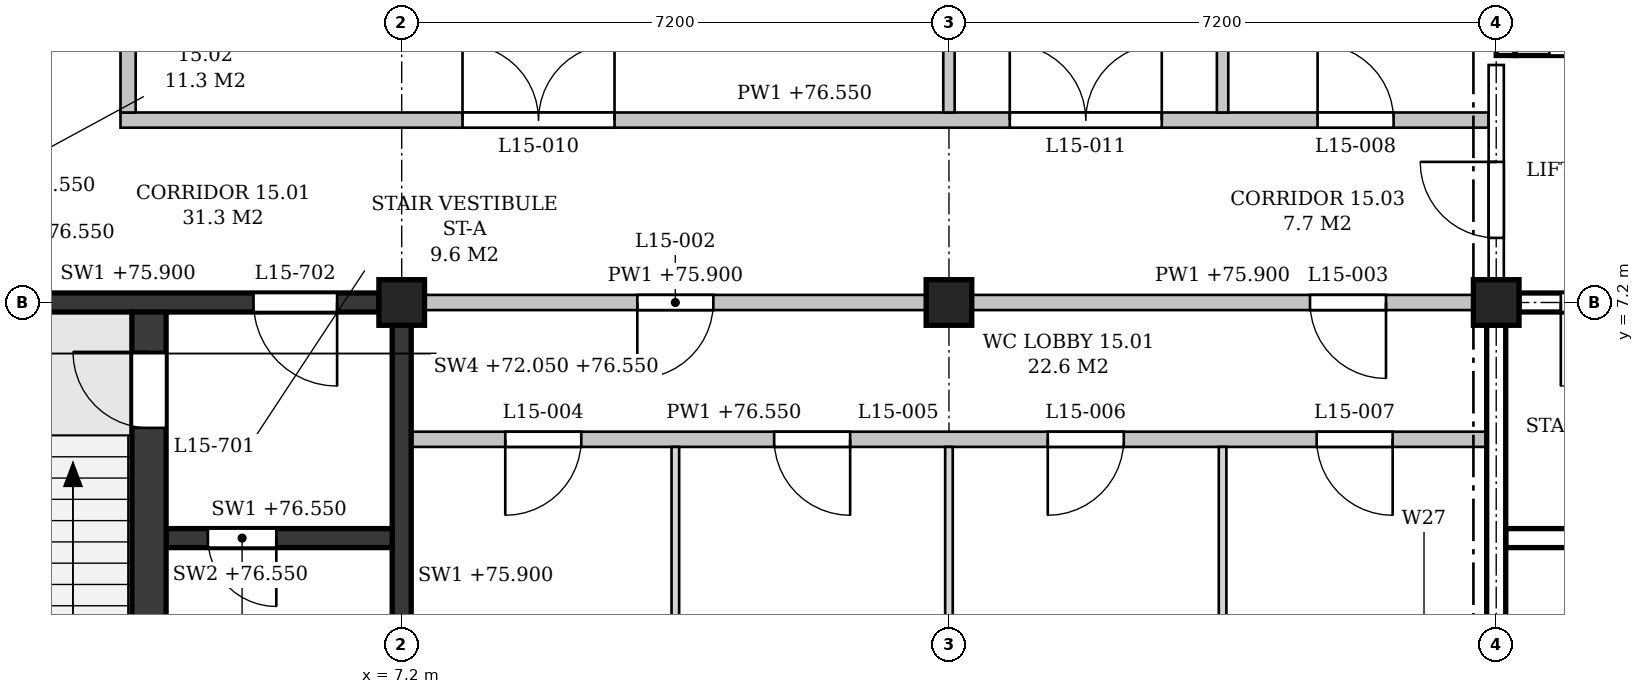
"""IFC4 building model, lengths in metres.
Left out: names, types, materials, properties, quantities, classifications, styles, units other than length and angle.
Written with IfcOpenShell. Run it as: python <this file> out.ifc"""

import sys

from ifc_helpers import new_model, si_unit, direction, frame, frame_2d, origin, origin_2d, place, context, subcontext, project, spatial, polyline, rectangle, outline, extrude, element, fill, save


model = new_model("IFC4")
c1 = context("Model", 3, precision=1e-05, world=origin(), true_north=direction((0.0, 1.0)))
c2 = subcontext(c1, "Body", "Model", "MODEL_VIEW")
j1 = project(units=[si_unit("LENGTHUNIT", "METRE"), si_unit("PLANEANGLEUNIT", "RADIAN")], contexts=[c1])
p1 = place(None, origin())
s1 = spatial("IfcSite", under=j1, at=p1, CompositionType="ELEMENT")
p2 = place(p1, origin())
s2 = spatial("IfcBuilding", under=s1, at=p2, CompositionType="ELEMENT")
p3 = place(p2, frame((0.0, 0.0, 72.3)))
s3 = spatial("IfcBuildingStorey", under=s2, at=p3, CompositionType="ELEMENT", Elevation=72.3)
for number, where, z_axis, x_axis in (
    (1, (7.2, 7.2, 0.0), (0.0, 0.0, 1.0), (1.0, 0.0, 0.0)),
    (2, (14.4, 7.2, 0.0), (0.0, 0.0, 1.0), (1.0, 0.0, 0.0)),
    (3, (21.6, 7.2, 0.0), (0.0, 0.0, 1.0), (1.0, 0.0, 0.0)),
):
    element("IfcColumn", number, at=place(p3, frame(where, z_axis=z_axis, x_axis=x_axis)), inside=s3, PredefinedType="COLUMN", context=c2, shape_type="SweptSolid", body=[
        extrude(rectangle(XDim=0.6, YDim=0.6, at=origin_2d()), origin(), (0.0, 0.0, 1.0), 4.5),
    ])
p4 = place(p3, frame((0.3, 7.2, 0.0), z_axis=(0.0, 0.0, 1.0), x_axis=(1.0, 0.0, 0.0)))
e4 = element("IfcWall", 4, at=p4, inside=s3, PredefinedType="SHEAR", context=c2, shape_type="SweptSolid", body=[
    extrude(rectangle(XDim=6.6, YDim=0.25, at=frame_2d((3.3, 0.0))), origin(), (0.0, 0.0, 1.0), 3.6),
])
p5 = place(p4, frame((4.95, 0.0, 0.0)))
e5 = element("IfcOpeningElement", 5, at=p5, cuts=e4, PredefinedType="OPENING", context=c2, shape_type="SweptSolid", body=[
    extrude(rectangle(XDim=1.1, YDim=2.1, at=frame_2d((0.55, 1.05))), frame((0.0, 0.135, 0.0), z_axis=(0.0, -1.0, 0.0), x_axis=(1.0, 0.0, 0.0)), (0.0, 0.0, 1.0), 0.27),
])
p6 = place(p3, frame((7.2, 0.3, 0.0), z_axis=(0.0, 0.0, 1.0), x_axis=(0.0, 1.0, 0.0)))
e6 = element("IfcWall", 6, at=p6, inside=s3, PredefinedType="SHEAR", context=c2, shape_type="SweptSolid", body=[
    extrude(rectangle(XDim=6.6, YDim=0.25, at=frame_2d((3.3, 0.0))), origin(), (0.0, 0.0, 1.0), 3.6),
])
p7 = place(p3, frame((3.875, 0.15, 0.0), z_axis=(0.0, 0.0, 1.0), x_axis=(0.0, 1.0, 0.0)))
e7 = element("IfcWall", 7, at=p7, inside=s3, PredefinedType="SHEAR", context=c2, shape_type="SweptSolid", body=[
    extrude(rectangle(XDim=6.925, YDim=0.45, at=frame_2d((3.462, 0.0))), origin(), (0.0, 0.0, 1.0), 4.25),
])
p8 = place(p7, frame((5.4, 0.0, 0.0)))
e8 = element("IfcOpeningElement", 8, at=p8, cuts=e7, PredefinedType="OPENING", context=c2, shape_type="SweptSolid", body=[
    extrude(rectangle(XDim=1.0, YDim=2.1, at=frame_2d((0.5, 1.05))), frame((0.0, 0.235, 0.0), z_axis=(0.0, -1.0, 0.0), x_axis=(1.0, 0.0, 0.0)), (0.0, 0.0, 1.0), 0.47),
])
p9 = place(p3, frame((4.1, 4.1, 0.0), z_axis=(0.0, 0.0, 1.0), x_axis=(1.0, 0.0, 0.0)))
e9 = element("IfcWall", 9, at=p9, inside=s3, PredefinedType="SHEAR", context=c2, shape_type="SweptSolid", body=[
    extrude(rectangle(XDim=2.975, YDim=0.25, at=frame_2d((1.487, 0.0))), origin(), (0.0, 0.0, 1.0), 4.25),
])
p10 = place(p9, frame((0.55, 0.0, 0.0)))
e10 = element("IfcOpeningElement", 10, at=p10, cuts=e9, PredefinedType="OPENING", context=c2, shape_type="SweptSolid", body=[
    extrude(rectangle(XDim=0.9, YDim=2.1, at=frame_2d((0.45, 1.05))), frame((0.0, 0.135, 0.0), z_axis=(0.0, -1.0, 0.0), x_axis=(1.0, 0.0, 0.0)), (0.0, 0.0, 1.0), 0.27),
])
p11 = place(p3, frame((21.9, 7.2, 0.0), z_axis=(0.0, 0.0, 1.0), x_axis=(1.0, 0.0, 0.0)))
e11 = element("IfcWall", 11, at=p11, inside=s3, PredefinedType="SHEAR", context=c2, shape_type="SweptSolid", body=[
    extrude(rectangle(XDim=6.6, YDim=0.25, at=frame_2d((3.3, 0.0))), origin(), (0.0, 0.0, 1.0), 3.6),
])
p12 = place(p11, frame((0.55, 0.0, 0.0)))
e12 = element("IfcOpeningElement", 12, at=p12, cuts=e11, PredefinedType="OPENING", context=c2, shape_type="SweptSolid", body=[
    extrude(rectangle(XDim=1.1, YDim=2.1, at=frame_2d((0.55, 1.05))), frame((0.0, 0.135, 0.0), z_axis=(0.0, -1.0, 0.0), x_axis=(1.0, 0.0, 0.0)), (0.0, 0.0, 1.0), 0.27),
])
p13 = place(p3, frame((21.6, 0.3, 0.0), z_axis=(0.0, 0.0, 1.0), x_axis=(0.0, 1.0, 0.0)))
e13 = element("IfcWall", 13, at=p13, inside=s3, PredefinedType="SHEAR", context=c2, shape_type="SweptSolid", body=[
    extrude(rectangle(XDim=6.6, YDim=0.25, at=frame_2d((3.3, 0.0))), origin(), (0.0, 0.0, 1.0), 3.6),
])
p14 = place(p3, frame((21.725, 4.1, 0.0), z_axis=(0.0, 0.0, 1.0), x_axis=(1.0, 0.0, 0.0)))
e14 = element("IfcWall", 14, at=p14, inside=s3, PredefinedType="SHEAR", context=c2, shape_type="SweptSolid", body=[
    extrude(rectangle(XDim=2.975, YDim=0.25, at=frame_2d((1.487, 0.0))), origin(), (0.0, 0.0, 1.0), 4.25),
])
p15 = place(p14, frame((1.525, 0.0, 0.0)))
e15 = element("IfcOpeningElement", 15, at=p15, cuts=e14, PredefinedType="OPENING", context=c2, shape_type="SweptSolid", body=[
    extrude(rectangle(XDim=0.9, YDim=2.1, at=frame_2d((0.45, 1.05))), frame((0.0, 0.135, 0.0), z_axis=(0.0, -1.0, 0.0), x_axis=(1.0, 0.0, 0.0)), (0.0, 0.0, 1.0), 0.27),
])
p16 = place(p3, frame((21.725, 10.45, -0.25), z_axis=(0.0, 0.0, 1.0), x_axis=(0.0, 1.0, 0.0)))
e16 = element("IfcWall", 16, at=p16, inside=s3, PredefinedType="SHEAR", context=c2, shape_type="SweptSolid", body=[
    extrude(rectangle(XDim=3.65, YDim=0.25, at=frame_2d((1.825, 0.0))), origin(), (0.0, 0.0, 1.0), 3.85),
])
p17 = place(p3, frame((21.85, 10.575, -0.25), z_axis=(0.0, 0.0, 1.0), x_axis=(1.0, 0.0, 0.0)))
e17 = element("IfcWall", 17, at=p17, inside=s3, PredefinedType="SHEAR", context=c2, shape_type="SweptSolid", body=[
    extrude(rectangle(XDim=2.0, YDim=0.25, at=frame_2d((1.0, 0.0))), origin(), (0.0, 0.0, 1.0), 4.5),
])
p18 = place(p17, frame((0.45, 0.0, 0.25)))
e18 = element("IfcOpeningElement", 18, at=p18, cuts=e17, PredefinedType="OPENING", context=c2, shape_type="SweptSolid", body=[
    extrude(rectangle(XDim=1.1, YDim=2.1, at=frame_2d((0.55, 1.05))), frame((0.0, 0.135, 0.0), z_axis=(0.0, -1.0, 0.0), x_axis=(1.0, 0.0, 0.0)), (0.0, 0.0, 1.0), 0.27),
])
p19 = place(p3, frame((7.325, 5.4, 0.0), z_axis=(0.0, 0.0, 1.0), x_axis=(1.0, 0.0, 0.0)))
e19 = element("IfcWall", 19, at=p19, inside=s3, PredefinedType="PARTITIONING", context=c2, shape_type="SweptSolid", body=[
    extrude(outline(polyline([(0.0, 0.0), (14.15, 0.0), (14.15, 3.6), (14.075, 3.6), (14.075, 4.25), (7.275, 4.25), (7.275, 3.6), (6.875, 3.6), (6.875, 4.25), (0.075, 4.25), (0.075, 3.6), (0.0, 3.6), (0.0, 0.0)])), frame((0.0, 0.1, 0.0), z_axis=(0.0, -1.0, 0.0), x_axis=(1.0, 0.0, 0.0)), (0.0, 0.0, 1.0), 0.2),
])
p20 = place(p19, frame((1.238, 0.0, 0.0)))
e20 = element("IfcOpeningElement", 20, at=p20, cuts=e19, PredefinedType="OPENING", context=c2, shape_type="SweptSolid", body=[
    extrude(rectangle(XDim=1.0, YDim=2.1, at=frame_2d((0.5, 1.05))), frame((0.0, 0.11, 0.0), z_axis=(0.0, -1.0, 0.0), x_axis=(1.0, 0.0, 0.0)), (0.0, 0.0, 1.0), 0.22),
])
p21 = place(p19, frame((4.775, 0.0, 0.0)))
e21 = element("IfcOpeningElement", 21, at=p21, cuts=e19, PredefinedType="OPENING", context=c2, shape_type="SweptSolid", body=[
    extrude(rectangle(XDim=1.0, YDim=2.1, at=frame_2d((0.5, 1.05))), frame((0.0, 0.11, 0.0), z_axis=(0.0, -1.0, 0.0), x_axis=(1.0, 0.0, 0.0)), (0.0, 0.0, 1.0), 0.22),
])
p22 = place(p19, frame((8.375, 0.0, 0.0)))
e22 = element("IfcOpeningElement", 22, at=p22, cuts=e19, PredefinedType="OPENING", context=c2, shape_type="SweptSolid", body=[
    extrude(rectangle(XDim=1.0, YDim=2.1, at=frame_2d((0.5, 1.05))), frame((0.0, 0.11, 0.0), z_axis=(0.0, -1.0, 0.0), x_axis=(1.0, 0.0, 0.0)), (0.0, 0.0, 1.0), 0.22),
])
p23 = place(p19, frame((11.913, 0.0, 0.0)))
e23 = element("IfcOpeningElement", 23, at=p23, cuts=e19, PredefinedType="OPENING", context=c2, shape_type="SweptSolid", body=[
    extrude(rectangle(XDim=1.0, YDim=2.1, at=frame_2d((0.5, 1.05))), frame((0.0, 0.11, 0.0), z_axis=(0.0, -1.0, 0.0), x_axis=(1.0, 0.0, 0.0)), (0.0, 0.0, 1.0), 0.22),
])
p24 = place(p3, frame((7.5, 7.2, 0.0), z_axis=(0.0, 0.0, 1.0), x_axis=(1.0, 0.0, 0.0)))
e24 = element("IfcWall", 24, at=p24, inside=s3, PredefinedType="PARTITIONING", context=c2, shape_type="SweptSolid", body=[
    extrude(rectangle(XDim=6.6, YDim=0.2, at=frame_2d((3.3, 0.0))), origin(), (0.0, 0.0, 1.0), 3.6),
])
p25 = place(p24, frame((2.8, 0.0, 0.0)))
e25 = element("IfcOpeningElement", 25, at=p25, cuts=e24, PredefinedType="OPENING", context=c2, shape_type="SweptSolid", body=[
    extrude(rectangle(XDim=1.0, YDim=2.1, at=frame_2d((0.5, 1.05))), frame((0.0, 0.11, 0.0), z_axis=(0.0, -1.0, 0.0), x_axis=(1.0, 0.0, 0.0)), (0.0, 0.0, 1.0), 0.22),
])
p26 = place(p3, frame((14.7, 7.2, 0.0), z_axis=(0.0, 0.0, 1.0), x_axis=(1.0, 0.0, 0.0)))
e26 = element("IfcWall", 26, at=p26, inside=s3, PredefinedType="PARTITIONING", context=c2, shape_type="SweptSolid", body=[
    extrude(rectangle(XDim=6.6, YDim=0.2, at=frame_2d((3.3, 0.0))), origin(), (0.0, 0.0, 1.0), 3.6),
])
p27 = place(p26, frame((4.45, 0.0, 0.0)))
e27 = element("IfcOpeningElement", 27, at=p27, cuts=e26, PredefinedType="OPENING", context=c2, shape_type="SweptSolid", body=[
    extrude(rectangle(XDim=1.0, YDim=2.1, at=frame_2d((0.5, 1.05))), frame((0.0, 0.11, 0.0), z_axis=(0.0, -1.0, 0.0), x_axis=(1.0, 0.0, 0.0)), (0.0, 0.0, 1.0), 0.22),
])
p28 = place(p3, frame((3.5, 9.6, 0.0), z_axis=(0.0, 0.0, 1.0), x_axis=(1.0, 0.0, 0.0)))
e28 = element("IfcWall", 28, at=p28, inside=s3, PredefinedType="PARTITIONING", context=c2, shape_type="SweptSolid", body=[
    extrude(outline(polyline([(0.0, 0.0), (18.0, 0.0), (18.0, 3.6), (17.9, 3.6), (17.9, 4.25), (11.1, 4.25), (11.1, 3.6), (10.7, 3.6), (10.7, 4.25), (3.9, 4.25), (3.9, 3.6), (3.5, 3.6), (3.5, 4.25), (0.0, 4.25), (0.0, 0.0)])), frame((0.0, 0.1, 0.0), z_axis=(0.0, -1.0, 0.0), x_axis=(1.0, 0.0, 0.0)), (0.0, 0.0, 1.0), 0.2),
])
p29 = place(p28, frame((15.75, 0.0, 0.0)))
e29 = element("IfcOpeningElement", 29, at=p29, cuts=e28, PredefinedType="OPENING", context=c2, shape_type="SweptSolid", body=[
    extrude(rectangle(XDim=1.0, YDim=2.1, at=frame_2d((0.5, 1.05))), frame((0.0, 0.11, 0.0), z_axis=(0.0, -1.0, 0.0), x_axis=(1.0, 0.0, 0.0)), (0.0, 0.0, 1.0), 0.22),
])
p30 = place(p28, frame((4.5, 0.0, 0.0)))
e30 = element("IfcOpeningElement", 30, at=p30, cuts=e28, PredefinedType="OPENING", context=c2, shape_type="SweptSolid", body=[
    extrude(rectangle(XDim=2.0, YDim=2.1, at=frame_2d((1.0, 1.05))), frame((0.0, 0.11, 0.0), z_axis=(0.0, -1.0, 0.0), x_axis=(1.0, 0.0, 0.0)), (0.0, 0.0, 1.0), 0.22),
])
p31 = place(p28, frame((11.7, 0.0, 0.0)))
e31 = element("IfcOpeningElement", 31, at=p31, cuts=e28, PredefinedType="OPENING", context=c2, shape_type="SweptSolid", body=[
    extrude(rectangle(XDim=2.0, YDim=2.1, at=frame_2d((1.0, 1.05))), frame((0.0, 0.11, 0.0), z_axis=(0.0, -1.0, 0.0), x_axis=(1.0, 0.0, 0.0)), (0.0, 0.0, 1.0), 0.22),
])
p32 = place(p3, frame((3.6, 9.7, 0.0), z_axis=(0.0, 0.0, 1.0), x_axis=(0.0, 1.0, 0.0)))
e32 = element("IfcWall", 32, at=p32, inside=s3, PredefinedType="PARTITIONING", context=c2, shape_type="SweptSolid", body=[
    extrude(rectangle(XDim=1.1, YDim=0.2, at=frame_2d((0.55, 0.0))), origin(), (0.0, 0.0, 1.0), 4.25),
])
p33 = place(p3, frame((10.8, 0.15, 0.0), z_axis=(0.0, 0.0, 1.0), x_axis=(0.0, 1.0, 0.0)))
e33 = element("IfcWall", 33, at=p33, inside=s3, PredefinedType="PARTITIONING", context=c2, shape_type="SweptSolid", body=[
    extrude(rectangle(XDim=5.15, YDim=0.1, at=frame_2d((2.575, 0.0))), origin(), (0.0, 0.0, 1.0), 3.6),
])
p34 = place(p3, frame((14.4, 0.3, 0.0), z_axis=(0.0, 0.0, 1.0), x_axis=(0.0, 1.0, 0.0)))
e34 = element("IfcWall", 34, at=p34, inside=s3, PredefinedType="PARTITIONING", context=c2, shape_type="SweptSolid", body=[
    extrude(rectangle(XDim=5.0, YDim=0.1, at=frame_2d((2.5, 0.0))), origin(), (0.0, 0.0, 1.0), 3.6),
])
p35 = place(p3, frame((14.4, 9.7, 0.0), z_axis=(0.0, 0.0, 1.0), x_axis=(0.0, 1.0, 0.0)))
e35 = element("IfcWall", 35, at=p35, inside=s3, PredefinedType="PARTITIONING", context=c2, shape_type="SweptSolid", body=[
    extrude(rectangle(XDim=4.4, YDim=0.15, at=frame_2d((2.2, 0.0))), origin(), (0.0, 0.0, 1.0), 3.6),
])
p36 = place(p3, frame((18.0, 0.15, 0.0), z_axis=(0.0, 0.0, 1.0), x_axis=(0.0, 1.0, 0.0)))
e36 = element("IfcWall", 36, at=p36, inside=s3, PredefinedType="PARTITIONING", context=c2, shape_type="SweptSolid", body=[
    extrude(rectangle(XDim=5.15, YDim=0.1, at=frame_2d((2.575, 0.0))), origin(), (0.0, 0.0, 1.0), 3.6),
])
p37 = place(p3, frame((18.0, 9.7, 0.0), z_axis=(0.0, 0.0, 1.0), x_axis=(0.0, 1.0, 0.0)))
e37 = element("IfcWall", 37, at=p37, inside=s3, PredefinedType="PARTITIONING", context=c2, shape_type="SweptSolid", body=[
    extrude(rectangle(XDim=4.55, YDim=0.15, at=frame_2d((2.275, 0.0))), origin(), (0.0, 0.0, 1.0), 3.6),
])
p38 = place(p3, frame((21.6, 7.5, 0.0), z_axis=(0.0, 0.0, 1.0), x_axis=(0.0, 1.0, 0.0)))
e38 = element("IfcWall", 38, at=p38, inside=s3, PredefinedType="PARTITIONING", context=c2, shape_type="SweptSolid", body=[
    extrude(rectangle(XDim=2.825, YDim=0.2, at=frame_2d((1.413, 0.0))), origin(), (0.0, 0.0, 1.0), 3.6),
])
p39 = place(p38, frame((0.55, 0.0, 0.0)))
e39 = element("IfcOpeningElement", 39, at=p39, cuts=e38, PredefinedType="OPENING", context=c2, shape_type="SweptSolid", body=[
    extrude(rectangle(XDim=1.0, YDim=2.1, at=frame_2d((0.5, 1.05))), frame((0.0, 0.11, 0.0), z_axis=(0.0, -1.0, 0.0), x_axis=(1.0, 0.0, 0.0)), (0.0, 0.0, 1.0), 0.22),
])
p40 = place(p8, origin())
e40 = element("IfcDoor", 40, at=p40, inside=s3, OperationType="SINGLE_SWING_RIGHT", PredefinedType="DOOR", context=c2, shape_type="SweptSolid", body=[
    extrude(rectangle(XDim=1.0, YDim=2.1, at=frame_2d((0.5, 1.05))), frame((0.0, 0.025, 0.0), z_axis=(0.0, -1.0, 0.0), x_axis=(1.0, 0.0, 0.0)), (0.0, 0.0, 1.0), 0.05),
])
fill(e8, e40)
p41 = place(p5, frame((1.1, 0.0, 0.0), z_axis=(0.0, 0.0, 1.0), x_axis=(-1.0, 0.0, 0.0)))
e41 = element("IfcDoor", 41, at=p41, inside=s3, OperationType="SINGLE_SWING_LEFT", PredefinedType="DOOR", context=c2, shape_type="SweptSolid", body=[
    extrude(rectangle(XDim=1.1, YDim=2.1, at=frame_2d((0.55, 1.05))), frame((0.0, 0.025, 0.0), z_axis=(0.0, -1.0, 0.0), x_axis=(1.0, 0.0, 0.0)), (0.0, 0.0, 1.0), 0.05),
])
fill(e5, e41)
p42 = place(p10, frame((0.9, 0.0, 0.0), z_axis=(0.0, 0.0, 1.0), x_axis=(-1.0, 0.0, 0.0)))
e42 = element("IfcDoor", 42, at=p42, inside=s3, OperationType="SINGLE_SWING_LEFT", PredefinedType="DOOR", context=c2, shape_type="SweptSolid", body=[
    extrude(rectangle(XDim=0.9, YDim=2.1, at=frame_2d((0.45, 1.05))), frame((0.0, 0.025, 0.0), z_axis=(0.0, -1.0, 0.0), x_axis=(1.0, 0.0, 0.0)), (0.0, 0.0, 1.0), 0.05),
])
fill(e10, e42)
p43 = place(p12, frame((1.1, 0.0, 0.0), z_axis=(0.0, 0.0, 1.0), x_axis=(-1.0, 0.0, 0.0)))
e43 = element("IfcDoor", 43, at=p43, inside=s3, OperationType="SINGLE_SWING_RIGHT", PredefinedType="DOOR", context=c2, shape_type="SweptSolid", body=[
    extrude(rectangle(XDim=1.1, YDim=2.1, at=frame_2d((0.55, 1.05))), frame((0.0, 0.025, 0.0), z_axis=(0.0, -1.0, 0.0), x_axis=(1.0, 0.0, 0.0)), (0.0, 0.0, 1.0), 0.05),
])
fill(e12, e43)
p44 = place(p39, origin())
e44 = element("IfcDoor", 44, at=p44, inside=s3, OperationType="SINGLE_SWING_RIGHT", PredefinedType="DOOR", context=c2, shape_type="SweptSolid", body=[
    extrude(rectangle(XDim=1.0, YDim=2.1, at=frame_2d((0.5, 1.05))), frame((0.0, 0.025, 0.0), z_axis=(0.0, -1.0, 0.0), x_axis=(1.0, 0.0, 0.0)), (0.0, 0.0, 1.0), 0.05),
])
fill(e39, e44)
p45 = place(p25, frame((1.0, 0.0, 0.0), z_axis=(0.0, 0.0, 1.0), x_axis=(-1.0, 0.0, 0.0)))
e45 = element("IfcDoor", 45, at=p45, inside=s3, OperationType="SINGLE_SWING_RIGHT", PredefinedType="DOOR", context=c2, shape_type="SweptSolid", body=[
    extrude(rectangle(XDim=1.0, YDim=2.1, at=frame_2d((0.5, 1.05))), frame((0.0, 0.025, 0.0), z_axis=(0.0, -1.0, 0.0), x_axis=(1.0, 0.0, 0.0)), (0.0, 0.0, 1.0), 0.05),
])
fill(e25, e45)
p46 = place(p27, frame((1.0, 0.0, 0.0), z_axis=(0.0, 0.0, 1.0), x_axis=(-1.0, 0.0, 0.0)))
e46 = element("IfcDoor", 46, at=p46, inside=s3, OperationType="SINGLE_SWING_LEFT", PredefinedType="DOOR", context=c2, shape_type="SweptSolid", body=[
    extrude(rectangle(XDim=1.0, YDim=2.1, at=frame_2d((0.5, 1.05))), frame((0.0, 0.025, 0.0), z_axis=(0.0, -1.0, 0.0), x_axis=(1.0, 0.0, 0.0)), (0.0, 0.0, 1.0), 0.05),
])
fill(e27, e46)
p47 = place(p20, frame((1.0, 0.0, 0.0), z_axis=(0.0, 0.0, 1.0), x_axis=(-1.0, 0.0, 0.0)))
e47 = element("IfcDoor", 47, at=p47, inside=s3, OperationType="SINGLE_SWING_RIGHT", PredefinedType="DOOR", context=c2, shape_type="SweptSolid", body=[
    extrude(rectangle(XDim=1.0, YDim=2.1, at=frame_2d((0.5, 1.05))), frame((0.0, 0.025, 0.0), z_axis=(0.0, -1.0, 0.0), x_axis=(1.0, 0.0, 0.0)), (0.0, 0.0, 1.0), 0.05),
])
fill(e20, e47)
p48 = place(p21, frame((1.0, 0.0, 0.0), z_axis=(0.0, 0.0, 1.0), x_axis=(-1.0, 0.0, 0.0)))
e48 = element("IfcDoor", 48, at=p48, inside=s3, OperationType="SINGLE_SWING_LEFT", PredefinedType="DOOR", context=c2, shape_type="SweptSolid", body=[
    extrude(rectangle(XDim=1.0, YDim=2.1, at=frame_2d((0.5, 1.05))), frame((0.0, 0.025, 0.0), z_axis=(0.0, -1.0, 0.0), x_axis=(1.0, 0.0, 0.0)), (0.0, 0.0, 1.0), 0.05),
])
fill(e21, e48)
p49 = place(p22, frame((1.0, 0.0, 0.0), z_axis=(0.0, 0.0, 1.0), x_axis=(-1.0, 0.0, 0.0)))
e49 = element("IfcDoor", 49, at=p49, inside=s3, OperationType="SINGLE_SWING_RIGHT", PredefinedType="DOOR", context=c2, shape_type="SweptSolid", body=[
    extrude(rectangle(XDim=1.0, YDim=2.1, at=frame_2d((0.5, 1.05))), frame((0.0, 0.025, 0.0), z_axis=(0.0, -1.0, 0.0), x_axis=(1.0, 0.0, 0.0)), (0.0, 0.0, 1.0), 0.05),
])
fill(e22, e49)
p50 = place(p23, frame((1.0, 0.0, 0.0), z_axis=(0.0, 0.0, 1.0), x_axis=(-1.0, 0.0, 0.0)))
e50 = element("IfcDoor", 50, at=p50, inside=s3, OperationType="SINGLE_SWING_LEFT", PredefinedType="DOOR", context=c2, shape_type="SweptSolid", body=[
    extrude(rectangle(XDim=1.0, YDim=2.1, at=frame_2d((0.5, 1.05))), frame((0.0, 0.025, 0.0), z_axis=(0.0, -1.0, 0.0), x_axis=(1.0, 0.0, 0.0)), (0.0, 0.0, 1.0), 0.05),
])
fill(e23, e50)
p51 = place(p29, origin())
e51 = element("IfcDoor", 51, at=p51, inside=s3, OperationType="SINGLE_SWING_LEFT", PredefinedType="DOOR", context=c2, shape_type="SweptSolid", body=[
    extrude(rectangle(XDim=1.0, YDim=2.1, at=frame_2d((0.5, 1.05))), frame((0.0, 0.025, 0.0), z_axis=(0.0, -1.0, 0.0), x_axis=(1.0, 0.0, 0.0)), (0.0, 0.0, 1.0), 0.05),
])
fill(e29, e51)
p52 = place(p30, origin())
e52 = element("IfcDoor", 52, at=p52, inside=s3, OperationType="DOUBLE_DOOR_SINGLE_SWING", PredefinedType="DOOR", context=c2, shape_type="SweptSolid", body=[
    extrude(rectangle(XDim=2.0, YDim=2.1, at=frame_2d((1.0, 1.05))), frame((0.0, 0.025, 0.0), z_axis=(0.0, -1.0, 0.0), x_axis=(1.0, 0.0, 0.0)), (0.0, 0.0, 1.0), 0.05),
])
fill(e30, e52)
p53 = place(p31, origin())
e53 = element("IfcDoor", 53, at=p53, inside=s3, OperationType="DOUBLE_DOOR_SINGLE_SWING", PredefinedType="DOOR", context=c2, shape_type="SweptSolid", body=[
    extrude(rectangle(XDim=2.0, YDim=2.1, at=frame_2d((1.0, 1.05))), frame((0.0, 0.025, 0.0), z_axis=(0.0, -1.0, 0.0), x_axis=(1.0, 0.0, 0.0)), (0.0, 0.0, 1.0), 0.05),
])
fill(e31, e53)
save(model, sys.argv[1])
